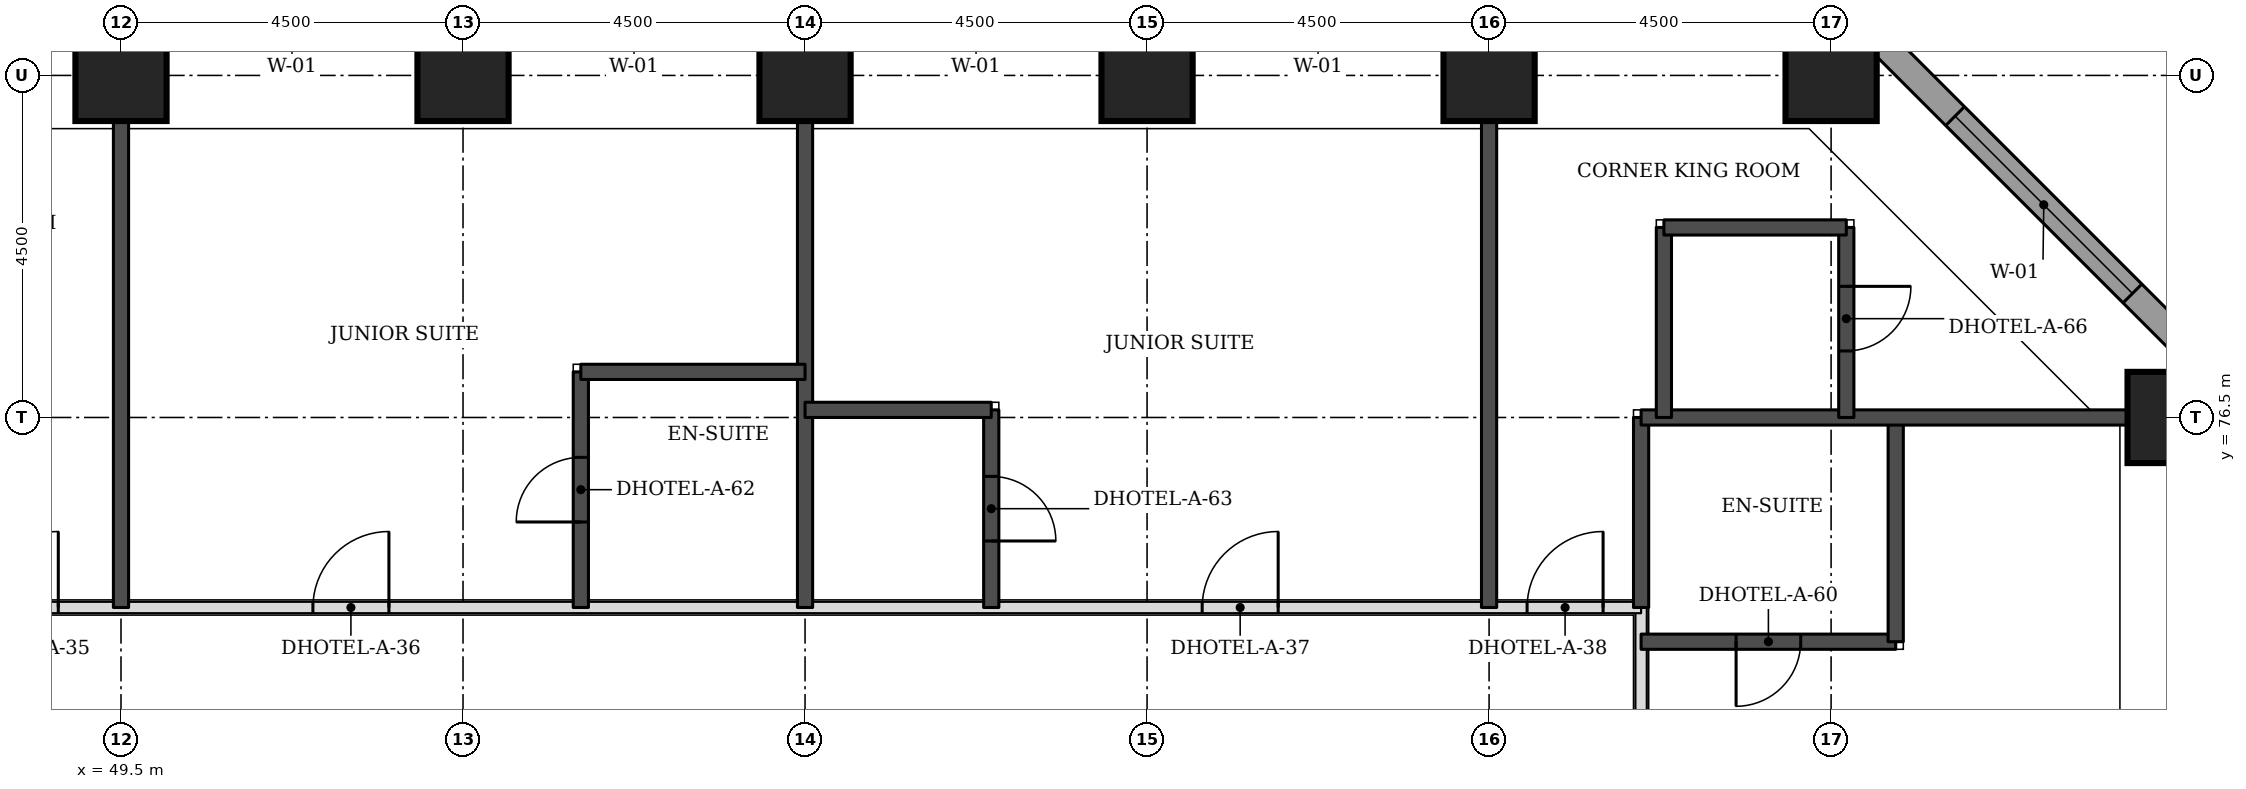
"""IFC4 building model, lengths in metres.
Left out: names, types, materials, properties, quantities, classifications, styles, units other than length and angle.
Written with IfcOpenShell. Run it as: python <this file> out.ifc"""

import sys

from ifc_helpers import new_model, si_unit, direction, frame, frame_2d, origin, origin_2d, place, context, subcontext, project, spatial, rectangle, extrude, element, fill, save


model = new_model("IFC4")
c1 = context("Model", 3, precision=1e-05, world=origin(), true_north=direction((0.0, 1.0)))
c2 = subcontext(c1, "Body", "Model", "MODEL_VIEW")
j1 = project(units=[si_unit("LENGTHUNIT", "METRE"), si_unit("PLANEANGLEUNIT", "RADIAN")], contexts=[c1])
p1 = place(None, origin())
s1 = spatial("IfcSite", under=j1, at=p1, CompositionType="ELEMENT")
p2 = place(p1, origin())
s2 = spatial("IfcBuilding", under=s1, at=p2, CompositionType="ELEMENT")
p3 = place(p2, frame((0.0, 0.0, 26.4)))
s3 = spatial("IfcBuildingStorey", under=s2, at=p3, CompositionType="ELEMENT", Elevation=26.4)
for number, where, z_axis, x_axis in (
    (1, (76.5, 76.5, 0.0), (0.0, 0.0, 1.0), (1.0, 0.0, 0.0)),
    (2, (49.5, 81.0, 0.0), (0.0, 0.0, 1.0), (1.0, 0.0, 0.0)),
    (3, (54.0, 81.0, 0.0), (0.0, 0.0, 1.0), (1.0, 0.0, 0.0)),
    (4, (58.5, 81.0, 0.0), (0.0, 0.0, 1.0), (1.0, 0.0, 0.0)),
    (5, (63.0, 81.0, 0.0), (0.0, 0.0, 1.0), (1.0, 0.0, 0.0)),
    (6, (67.5, 81.0, 0.0), (0.0, 0.0, 1.0), (1.0, 0.0, 0.0)),
    (7, (72.0, 81.0, 0.0), (0.0, 0.0, 1.0), (1.0, 0.0, 0.0)),
):
    element("IfcColumn", number, at=place(p3, frame(where, z_axis=z_axis, x_axis=x_axis)), inside=s3, PredefinedType="COLUMN", context=c2, shape_type="SweptSolid", body=[
        extrude(rectangle(XDim=1.2, YDim=1.2, at=origin_2d()), origin(), (0.0, 0.0, 1.0), 3.3),
    ])
p4 = place(p3, frame((77.326, 76.77, 0.0), z_axis=(0.0, 0.0, 1.0), x_axis=(-0.707106781187, 0.707106781187, 0.0)))
e8 = element("IfcWall", 8, at=p4, inside=s3, PredefinedType="STANDARD", context=c2, shape_type="SweptSolid", body=[
    extrude(rectangle(XDim=7.151, YDim=0.35, at=frame_2d((3.576, 0.0))), origin(), (0.0, 0.0, 1.0), 3.055),
])
p5 = place(p4, frame((1.926, 0.0, 0.8)))
e9 = element("IfcOpeningElement", 9, at=p5, cuts=e8, PredefinedType="OPENING", context=c2, shape_type="SweptSolid", body=[
    extrude(rectangle(XDim=3.3, YDim=1.5, at=frame_2d((1.65, 0.75))), frame((0.0, 0.185, 0.0), z_axis=(0.0, -1.0, 0.0), x_axis=(1.0, 0.0, 0.0)), (0.0, 0.0, 1.0), 0.37),
])
p6 = place(p3, frame((69.5, 47.5, 0.0), z_axis=(0.0, 0.0, 1.0), x_axis=(0.0, 1.0, 0.0)))
e10 = element("IfcWall", 10, at=p6, inside=s3, PredefinedType="PARTITIONING", context=c2, shape_type="SweptSolid", body=[
    extrude(rectangle(XDim=26.5, YDim=0.15, at=frame_2d((13.25, 0.0))), origin(), (0.0, 0.0, 1.0), 3.08),
])
p7 = place(p6, frame((22.525, 0.0, 0.0)))
e11 = element("IfcOpeningElement", 11, at=p7, cuts=e10, PredefinedType="OPENING", context=c2, shape_type="SweptSolid", body=[
    extrude(rectangle(XDim=1.0, YDim=2.1, at=frame_2d((0.5, 1.05))), frame((0.0, 0.085, 0.0), z_axis=(0.0, -1.0, 0.0), x_axis=(1.0, 0.0, 0.0)), (0.0, 0.0, 1.0), 0.17),
])
p8 = place(p6, frame((16.225, 0.0, 0.0)))
e12 = element("IfcOpeningElement", 12, at=p8, cuts=e10, PredefinedType="OPENING", context=c2, shape_type="SweptSolid", body=[
    extrude(rectangle(XDim=1.0, YDim=2.1, at=frame_2d((0.5, 1.05))), frame((0.0, 0.085, 0.0), z_axis=(0.0, -1.0, 0.0), x_axis=(1.0, 0.0, 0.0)), (0.0, 0.0, 1.0), 0.17),
])
p9 = place(p6, frame((4.25, 0.0, 0.0)))
e13 = element("IfcOpeningElement", 13, at=p9, cuts=e10, PredefinedType="OPENING", context=c2, shape_type="SweptSolid", body=[
    extrude(rectangle(XDim=1.1, YDim=2.1, at=frame_2d((0.55, 1.05))), frame((0.0, 0.085, 0.0), z_axis=(0.0, -1.0, 0.0), x_axis=(1.0, 0.0, 0.0)), (0.0, 0.0, 1.0), 0.17),
])
p10 = place(p6, frame((0.447, 0.0, 0.0)))
e14 = element("IfcOpeningElement", 14, at=p10, cuts=e10, PredefinedType="OPENING", context=c2, shape_type="SweptSolid", body=[
    extrude(rectangle(XDim=1.0, YDim=2.1, at=frame_2d((0.5, 1.05))), frame((0.0, 0.085, 0.0), z_axis=(0.0, -1.0, 0.0), x_axis=(1.0, 0.0, 0.0)), (0.0, 0.0, 1.0), 0.17),
])
p11 = place(p3, frame((43.0, 74.0, 0.0), z_axis=(0.0, 0.0, 1.0), x_axis=(1.0, 0.0, 0.0)))
e15 = element("IfcWall", 15, at=p11, inside=s3, PredefinedType="PARTITIONING", context=c2, shape_type="SweptSolid", body=[
    extrude(rectangle(XDim=26.5, YDim=0.15, at=frame_2d((13.25, 0.0))), origin(), (0.0, 0.0, 1.0), 3.08),
])
p12 = place(p11, frame((4.675, 0.0, 0.0)))
e16 = element("IfcOpeningElement", 16, at=p12, cuts=e15, PredefinedType="OPENING", context=c2, shape_type="SweptSolid", body=[
    extrude(rectangle(XDim=1.0, YDim=2.1, at=frame_2d((0.5, 1.05))), frame((0.0, 0.085, 0.0), z_axis=(0.0, -1.0, 0.0), x_axis=(1.0, 0.0, 0.0)), (0.0, 0.0, 1.0), 0.17),
])
p13 = place(p11, frame((9.025, 0.0, 0.0)))
e17 = element("IfcOpeningElement", 17, at=p13, cuts=e15, PredefinedType="OPENING", context=c2, shape_type="SweptSolid", body=[
    extrude(rectangle(XDim=1.0, YDim=2.1, at=frame_2d((0.5, 1.05))), frame((0.0, 0.085, 0.0), z_axis=(0.0, -1.0, 0.0), x_axis=(1.0, 0.0, 0.0)), (0.0, 0.0, 1.0), 0.17),
])
p14 = place(p11, frame((20.725, 0.0, 0.0)))
e18 = element("IfcOpeningElement", 18, at=p14, cuts=e15, PredefinedType="OPENING", context=c2, shape_type="SweptSolid", body=[
    extrude(rectangle(XDim=1.0, YDim=2.1, at=frame_2d((0.5, 1.05))), frame((0.0, 0.085, 0.0), z_axis=(0.0, -1.0, 0.0), x_axis=(1.0, 0.0, 0.0)), (0.0, 0.0, 1.0), 0.17),
])
p15 = place(p11, frame((0.5, 0.0, 0.0)))
e19 = element("IfcOpeningElement", 19, at=p15, cuts=e15, PredefinedType="OPENING", context=c2, shape_type="SweptSolid", body=[
    extrude(rectangle(XDim=1.0, YDim=2.1, at=frame_2d((0.5, 1.05))), frame((0.0, 0.085, 0.0), z_axis=(0.0, -1.0, 0.0), x_axis=(1.0, 0.0, 0.0)), (0.0, 0.0, 1.0), 0.17),
])
p16 = place(p11, frame((25.0, 0.0, 0.0)))
e20 = element("IfcOpeningElement", 20, at=p16, cuts=e15, PredefinedType="OPENING", context=c2, shape_type="SweptSolid", body=[
    extrude(rectangle(XDim=1.0, YDim=2.1, at=frame_2d((0.5, 1.05))), frame((0.0, 0.085, 0.0), z_axis=(0.0, -1.0, 0.0), x_axis=(1.0, 0.0, 0.0)), (0.0, 0.0, 1.0), 0.17),
])
p17 = place(p3, frame((69.5, 73.55, 0.0), z_axis=(0.0, 0.0, 1.0), x_axis=(1.0, 0.0, 0.0)))
e21 = element("IfcWall", 21, at=p17, inside=s3, PredefinedType="SOLIDWALL", context=c2, shape_type="SweptSolid", body=[
    extrude(rectangle(XDim=3.35, YDim=0.2, at=frame_2d((1.675, 0.0))), origin(), (0.0, 0.0, 1.0), 3.08),
])
p18 = place(p17, frame((1.25, 0.0, 0.0)))
e22 = element("IfcOpeningElement", 22, at=p18, cuts=e21, PredefinedType="OPENING", context=c2, shape_type="SweptSolid", body=[
    extrude(rectangle(XDim=0.85, YDim=2.1, at=frame_2d((0.425, 1.05))), frame((0.0, 0.11, 0.0), z_axis=(0.0, -1.0, 0.0), x_axis=(1.0, 0.0, 0.0)), (0.0, 0.0, 1.0), 0.22),
])
p19 = place(p3, frame((72.85, 73.55, 0.0), z_axis=(0.0, 0.0, 1.0), x_axis=(0.0, 1.0, 0.0)))
e23 = element("IfcWall", 23, at=p19, inside=s3, PredefinedType="SOLIDWALL", context=c2, shape_type="SweptSolid", body=[
    extrude(rectangle(XDim=2.95, YDim=0.2, at=frame_2d((1.475, 0.0))), origin(), (0.0, 0.0, 1.0), 3.08),
])
p20 = place(p3, frame((49.5, 74.0, 0.0), z_axis=(0.0, 0.0, 1.0), x_axis=(0.0, 1.0, 0.0)))
e24 = element("IfcWall", 24, at=p20, inside=s3, PredefinedType="SOLIDWALL", context=c2, shape_type="SweptSolid", body=[
    extrude(rectangle(XDim=6.4, YDim=0.2, at=frame_2d((3.2, 0.0))), origin(), (0.0, 0.0, 1.0), 3.08),
])
p21 = place(p3, frame((55.55, 74.0, 0.0), z_axis=(0.0, 0.0, 1.0), x_axis=(0.0, 1.0, 0.0)))
e25 = element("IfcWall", 25, at=p21, inside=s3, PredefinedType="SOLIDWALL", context=c2, shape_type="SweptSolid", body=[
    extrude(rectangle(XDim=3.1, YDim=0.2, at=frame_2d((1.55, 0.0))), origin(), (0.0, 0.0, 1.0), 3.08),
])
p22 = place(p21, frame((1.125, 0.0, 0.0)))
e26 = element("IfcOpeningElement", 26, at=p22, cuts=e25, PredefinedType="OPENING", context=c2, shape_type="SweptSolid", body=[
    extrude(rectangle(XDim=0.85, YDim=2.1, at=frame_2d((0.425, 1.05))), frame((0.0, 0.11, 0.0), z_axis=(0.0, -1.0, 0.0), x_axis=(1.0, 0.0, 0.0)), (0.0, 0.0, 1.0), 0.22),
])
p23 = place(p3, frame((58.5, 74.0, 0.0), z_axis=(0.0, 0.0, 1.0), x_axis=(0.0, 1.0, 0.0)))
e27 = element("IfcWall", 27, at=p23, inside=s3, PredefinedType="SOLIDWALL", context=c2, shape_type="SweptSolid", body=[
    extrude(rectangle(XDim=6.4, YDim=0.2, at=frame_2d((3.2, 0.0))), origin(), (0.0, 0.0, 1.0), 3.08),
])
p24 = place(p3, frame((60.95, 74.0, 0.0), z_axis=(0.0, 0.0, 1.0), x_axis=(0.0, 1.0, 0.0)))
e28 = element("IfcWall", 28, at=p24, inside=s3, PredefinedType="SOLIDWALL", context=c2, shape_type="SweptSolid", body=[
    extrude(rectangle(XDim=2.6, YDim=0.2, at=frame_2d((1.3, 0.0))), origin(), (0.0, 0.0, 1.0), 3.08),
])
p25 = place(p24, frame((0.875, 0.0, 0.0)))
e29 = element("IfcOpeningElement", 29, at=p25, cuts=e28, PredefinedType="OPENING", context=c2, shape_type="SweptSolid", body=[
    extrude(rectangle(XDim=0.85, YDim=2.1, at=frame_2d((0.425, 1.05))), frame((0.0, 0.11, 0.0), z_axis=(0.0, -1.0, 0.0), x_axis=(1.0, 0.0, 0.0)), (0.0, 0.0, 1.0), 0.22),
])
p26 = place(p3, frame((67.5, 74.0, 0.0), z_axis=(0.0, 0.0, 1.0), x_axis=(0.0, 1.0, 0.0)))
e30 = element("IfcWall", 30, at=p26, inside=s3, PredefinedType="SOLIDWALL", context=c2, shape_type="SweptSolid", body=[
    extrude(rectangle(XDim=6.4, YDim=0.2, at=frame_2d((3.2, 0.0))), origin(), (0.0, 0.0, 1.0), 3.08),
])
p27 = place(p3, frame((69.5, 74.0, 0.0), z_axis=(0.0, 0.0, 1.0), x_axis=(0.0, 1.0, 0.0)))
e31 = element("IfcWall", 31, at=p27, inside=s3, PredefinedType="SOLIDWALL", context=c2, shape_type="SweptSolid", body=[
    extrude(rectangle(XDim=2.5, YDim=0.2, at=frame_2d((1.25, 0.0))), origin(), (0.0, 0.0, 1.0), 3.08),
])
p28 = place(p3, frame((69.5, 76.5, 0.0), z_axis=(0.0, 0.0, 1.0), x_axis=(1.0, 0.0, 0.0)))
e32 = element("IfcWall", 32, at=p28, inside=s3, PredefinedType="SOLIDWALL", context=c2, shape_type="SweptSolid", body=[
    extrude(rectangle(XDim=6.4, YDim=0.2, at=frame_2d((3.2, 0.0))), origin(), (0.0, 0.0, 1.0), 3.08),
])
p29 = place(p3, frame((69.8, 76.5, 0.0), z_axis=(0.0, 0.0, 1.0), x_axis=(0.0, 1.0, 0.0)))
e33 = element("IfcWall", 33, at=p29, inside=s3, PredefinedType="SOLIDWALL", context=c2, shape_type="SweptSolid", body=[
    extrude(rectangle(XDim=2.5, YDim=0.2, at=frame_2d((1.25, 0.0))), origin(), (0.0, 0.0, 1.0), 3.08),
])
p30 = place(p3, frame((72.2, 76.5, 0.0), z_axis=(0.0, 0.0, 1.0), x_axis=(0.0, 1.0, 0.0)))
e34 = element("IfcWall", 34, at=p30, inside=s3, PredefinedType="SOLIDWALL", context=c2, shape_type="SweptSolid", body=[
    extrude(rectangle(XDim=2.5, YDim=0.2, at=frame_2d((1.25, 0.0))), origin(), (0.0, 0.0, 1.0), 3.08),
])
p31 = place(p30, frame((0.875, 0.0, 0.0)))
e35 = element("IfcOpeningElement", 35, at=p31, cuts=e34, PredefinedType="OPENING", context=c2, shape_type="SweptSolid", body=[
    extrude(rectangle(XDim=0.85, YDim=2.1, at=frame_2d((0.425, 1.05))), frame((0.0, 0.11, 0.0), z_axis=(0.0, -1.0, 0.0), x_axis=(1.0, 0.0, 0.0)), (0.0, 0.0, 1.0), 0.22),
])
p32 = place(p3, frame((58.5, 76.6, 0.0), z_axis=(0.0, 0.0, 1.0), x_axis=(1.0, 0.0, 0.0)))
e36 = element("IfcWall", 36, at=p32, inside=s3, PredefinedType="SOLIDWALL", context=c2, shape_type="SweptSolid", body=[
    extrude(rectangle(XDim=2.45, YDim=0.2, at=frame_2d((1.225, 0.0))), origin(), (0.0, 0.0, 1.0), 3.08),
])
p33 = place(p3, frame((55.55, 77.1, 0.0), z_axis=(0.0, 0.0, 1.0), x_axis=(1.0, 0.0, 0.0)))
e37 = element("IfcWall", 37, at=p33, inside=s3, PredefinedType="SOLIDWALL", context=c2, shape_type="SweptSolid", body=[
    extrude(rectangle(XDim=2.95, YDim=0.2, at=frame_2d((1.475, 0.0))), origin(), (0.0, 0.0, 1.0), 3.08),
])
p34 = place(p3, frame((69.8, 79.0, 0.0), z_axis=(0.0, 0.0, 1.0), x_axis=(1.0, 0.0, 0.0)))
e38 = element("IfcWall", 38, at=p34, inside=s3, PredefinedType="SOLIDWALL", context=c2, shape_type="SweptSolid", body=[
    extrude(rectangle(XDim=2.4, YDim=0.2, at=frame_2d((1.2, 0.0))), origin(), (0.0, 0.0, 1.0), 3.08),
])
p35 = place(p5, origin())
e39 = element("IfcWindow", 39, at=p35, inside=s3, PartitioningType="SINGLE_PANEL", PredefinedType="WINDOW", context=c2, shape_type="SweptSolid", body=[
    extrude(rectangle(XDim=3.3, YDim=1.5, at=frame_2d((1.65, 0.75))), frame((0.0, 0.085, 0.0), z_axis=(0.0, -1.0, 0.0), x_axis=(1.0, 0.0, 0.0)), (0.0, 0.0, 1.0), 0.06),
])
fill(e9, e39)
p36 = place(p12, origin())
e40 = element("IfcDoor", 40, at=p36, inside=s3, OperationType="SINGLE_SWING_RIGHT", PredefinedType="DOOR", context=c2, shape_type="SweptSolid", body=[
    extrude(rectangle(XDim=1.0, YDim=2.1, at=frame_2d((0.5, 1.05))), frame((0.0, 0.025, 0.0), z_axis=(0.0, -1.0, 0.0), x_axis=(1.0, 0.0, 0.0)), (0.0, 0.0, 1.0), 0.05),
])
fill(e16, e40)
p37 = place(p13, origin())
e41 = element("IfcDoor", 41, at=p37, inside=s3, OperationType="SINGLE_SWING_RIGHT", PredefinedType="DOOR", context=c2, shape_type="SweptSolid", body=[
    extrude(rectangle(XDim=1.0, YDim=2.1, at=frame_2d((0.5, 1.05))), frame((0.0, 0.025, 0.0), z_axis=(0.0, -1.0, 0.0), x_axis=(1.0, 0.0, 0.0)), (0.0, 0.0, 1.0), 0.05),
])
fill(e17, e41)
p38 = place(p22, origin())
e42 = element("IfcDoor", 42, at=p38, inside=s3, OperationType="SINGLE_SWING_LEFT", PredefinedType="DOOR", context=c2, shape_type="SweptSolid", body=[
    extrude(rectangle(XDim=0.85, YDim=2.1, at=frame_2d((0.425, 1.05))), frame((0.0, 0.025, 0.0), z_axis=(0.0, -1.0, 0.0), x_axis=(1.0, 0.0, 0.0)), (0.0, 0.0, 1.0), 0.05),
])
fill(e26, e42)
p39 = place(p14, origin())
e43 = element("IfcDoor", 43, at=p39, inside=s3, OperationType="SINGLE_SWING_RIGHT", PredefinedType="DOOR", context=c2, shape_type="SweptSolid", body=[
    extrude(rectangle(XDim=1.0, YDim=2.1, at=frame_2d((0.5, 1.05))), frame((0.0, 0.025, 0.0), z_axis=(0.0, -1.0, 0.0), x_axis=(1.0, 0.0, 0.0)), (0.0, 0.0, 1.0), 0.05),
])
fill(e18, e43)
p40 = place(p25, frame((0.85, 0.0, 0.0), z_axis=(0.0, 0.0, 1.0), x_axis=(-1.0, 0.0, 0.0)))
e44 = element("IfcDoor", 44, at=p40, inside=s3, OperationType="SINGLE_SWING_RIGHT", PredefinedType="DOOR", context=c2, shape_type="SweptSolid", body=[
    extrude(rectangle(XDim=0.85, YDim=2.1, at=frame_2d((0.425, 1.05))), frame((0.0, 0.025, 0.0), z_axis=(0.0, -1.0, 0.0), x_axis=(1.0, 0.0, 0.0)), (0.0, 0.0, 1.0), 0.05),
])
fill(e29, e44)
p41 = place(p18, frame((0.85, 0.0, 0.0), z_axis=(0.0, 0.0, 1.0), x_axis=(-1.0, 0.0, 0.0)))
e45 = element("IfcDoor", 45, at=p41, inside=s3, OperationType="SINGLE_SWING_RIGHT", PredefinedType="DOOR", context=c2, shape_type="SweptSolid", body=[
    extrude(rectangle(XDim=0.85, YDim=2.1, at=frame_2d((0.425, 1.05))), frame((0.0, 0.025, 0.0), z_axis=(0.0, -1.0, 0.0), x_axis=(1.0, 0.0, 0.0)), (0.0, 0.0, 1.0), 0.05),
])
fill(e22, e45)
p42 = place(p16, origin())
e46 = element("IfcDoor", 46, at=p42, inside=s3, OperationType="SINGLE_SWING_RIGHT", PredefinedType="DOOR", context=c2, shape_type="SweptSolid", body=[
    extrude(rectangle(XDim=1.0, YDim=2.1, at=frame_2d((0.5, 1.05))), frame((0.0, 0.025, 0.0), z_axis=(0.0, -1.0, 0.0), x_axis=(1.0, 0.0, 0.0)), (0.0, 0.0, 1.0), 0.05),
])
fill(e20, e46)
p43 = place(p31, frame((0.85, 0.0, 0.0), z_axis=(0.0, 0.0, 1.0), x_axis=(-1.0, 0.0, 0.0)))
e47 = element("IfcDoor", 47, at=p43, inside=s3, OperationType="SINGLE_SWING_LEFT", PredefinedType="DOOR", context=c2, shape_type="SweptSolid", body=[
    extrude(rectangle(XDim=0.85, YDim=2.1, at=frame_2d((0.425, 1.05))), frame((0.0, 0.025, 0.0), z_axis=(0.0, -1.0, 0.0), x_axis=(1.0, 0.0, 0.0)), (0.0, 0.0, 1.0), 0.05),
])
fill(e35, e47)
save(model, sys.argv[1])
